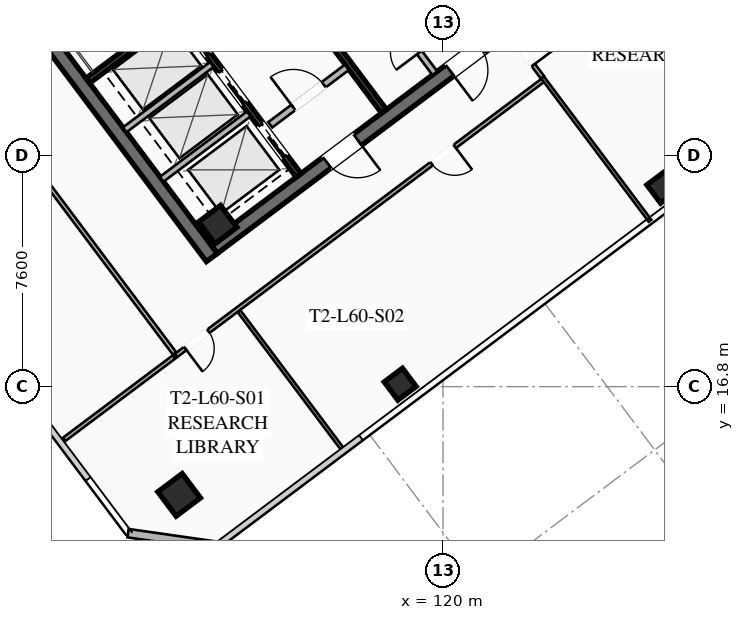
"""IFC4 building model, lengths in metres.
Left out: names, types, materials, properties, quantities, classifications, styles, units other than length and angle.
Written with IfcOpenShell. Run it as: python <this file> out.ifc"""

import sys

from ifc_helpers import new_model, si_unit, direction, frame, frame_2d, origin, origin_2d, place, context, subcontext, project, spatial, rectangle, hollow_rectangle, extrude, element, fill, save


model = new_model("IFC4")
c1 = context("Model", 3, precision=1e-05, world=origin(), true_north=direction((0.0, 1.0)))
c2 = subcontext(c1, "Body", "Model", "MODEL_VIEW")
j1 = project(units=[si_unit("LENGTHUNIT", "METRE"), si_unit("PLANEANGLEUNIT", "RADIAN")], contexts=[c1])
p1 = place(None, origin())
s1 = spatial("IfcSite", under=j1, at=p1, CompositionType="ELEMENT")
p2 = place(p1, origin())
s2 = spatial("IfcBuilding", under=s1, at=p2, CompositionType="ELEMENT")
p3 = place(p2, frame((0.0, 0.0, 221.95)))
s3 = spatial("IfcBuildingStorey", under=s2, at=p3, CompositionType="ELEMENT", Elevation=221.95)
p4 = place(p3, frame((112.396, 21.047, 0.0), z_axis=(0.0, 0.0, 1.0), x_axis=(-0.600005007985, 0.799996243986, 0.0)))
e1 = element("IfcWall", 1, at=p4, inside=s3, PredefinedType="SHEAR", context=c2, shape_type="SweptSolid", body=[
    extrude(rectangle(XDim=15.6, YDim=0.45, at=frame_2d((7.8, 0.0))), origin(), (0.0, 0.0, 1.0), 3.55),
])
p5 = place(p3, frame((124.649, 30.518, 0.0), z_axis=(0.0, 0.0, 1.0), x_axis=(-0.8, -0.6, 0.0)))
e2 = element("IfcWall", 2, at=p5, inside=s3, PredefinedType="SHEAR", context=c2, shape_type="SweptSolid", body=[
    extrude(rectangle(XDim=15.26, YDim=0.45, at=frame_2d((7.63, 0.0))), origin(), (0.0, 0.0, 1.0), 3.55),
])
p6 = place(p5, frame((9.33, 0.0, 0.0)))
e3 = element("IfcOpeningElement", 3, at=p6, cuts=e2, PredefinedType="OPENING", context=c2, shape_type="SweptSolid", body=[
    extrude(rectangle(XDim=1.25, YDim=2.25, at=frame_2d((0.625, 1.125))), frame((0.0, 0.235, 0.0), z_axis=(0.0, -1.0, 0.0), x_axis=(1.0, 0.0, 0.0)), (0.0, 0.0, 1.0), 0.47),
])
p7 = place(p5, frame((4.28, 0.0, 0.0)))
e4 = element("IfcOpeningElement", 4, at=p7, cuts=e2, PredefinedType="OPENING", context=c2, shape_type="SweptSolid", body=[
    extrude(rectangle(XDim=1.25, YDim=2.25, at=frame_2d((0.625, 1.125))), frame((0.0, 0.235, 0.0), z_axis=(0.0, -1.0, 0.0), x_axis=(1.0, 0.0, 0.0)), (0.0, 0.0, 1.0), 0.47),
])
p8 = place(p3, frame((112.59, 22.13, 0.0), z_axis=(0.0, 0.0, 1.0), x_axis=(0.799999996291, 0.600000004945, 0.0)))
e5 = element("IfcColumn", 5, at=p8, inside=s3, PredefinedType="COLUMN", context=c2, shape_type="SweptSolid", body=[
    extrude(hollow_rectangle(XDim=0.9, YDim=0.9, WallThickness=0.04, at=origin_2d()), origin(), (0.0, 0.0, 1.0), 3.37),
])
p9 = place(p3, frame((111.32, 13.24, 0.0), z_axis=(0.0, 0.0, 1.0), x_axis=(0.799999996291, 0.600000004945, 0.0)))
e6 = element("IfcColumn", 6, at=p9, inside=s3, PredefinedType="COLUMN", context=c2, shape_type="SweptSolid", body=[
    extrude(hollow_rectangle(XDim=1.0, YDim=1.0, WallThickness=0.04, at=origin_2d()), origin(), (0.0, 0.0, 1.0), 3.37),
])
for number, where, z_axis, x_axis in (
    (7, (118.59, 16.88, 0.0), (0.0, 0.0, 1.0), (0.8, 0.6, 0.0)),
    (8, (127.23, 23.36, 0.0), (0.0, 0.0, 1.0), (0.8, 0.6, 0.0)),
):
    element("IfcColumn", number, at=place(p3, frame(where, z_axis=z_axis, x_axis=x_axis)), inside=s3, PredefinedType="COLUMN", context=c2, shape_type="SweptSolid", body=[
        extrude(hollow_rectangle(XDim=0.75, YDim=0.75, WallThickness=0.032, at=origin_2d()), origin(), (0.0, 0.0, 1.0), 3.37),
    ])
p10 = place(p3, frame((112.58, 11.56, 0.0), z_axis=(0.0, 0.0, 1.0), x_axis=(-0.989954425158, 0.14138683146, 0.0)))
e9 = element("IfcWall", 9, at=p10, inside=s3, PredefinedType="SOLIDWALL", context=c2, shape_type="SweptSolid", body=[
    extrude(rectangle(XDim=2.97, YDim=0.28, at=frame_2d((1.485, 0.0))), origin(), (0.0, 0.0, 1.0), 3.37),
])
p11 = place(p3, frame((108.316, 26.862, 0.0), z_axis=(0.0, 0.0, 1.0), x_axis=(0.800014909178, 0.599980120581, 0.0)))
e10 = element("IfcWall", 10, at=p11, inside=s3, PredefinedType="SHEAR", context=c2, shape_type="SweptSolid", body=[
    extrude(rectangle(XDim=3.93, YDim=0.2, at=frame_2d((1.965, 0.0))), origin(), (0.0, 0.0, 1.0), 3.37),
])
p12 = place(p3, frame((118.058, 25.856, 0.0), z_axis=(0.0, 0.0, 1.0), x_axis=(-0.600002657301, 0.799998007018, 0.0)))
e11 = element("IfcWall", 11, at=p12, inside=s3, PredefinedType="SHEAR", context=c2, shape_type="SweptSolid", body=[
    extrude(rectangle(XDim=14.7, YDim=0.2, at=frame_2d((7.35, 0.0))), origin(), (0.0, 0.0, 1.0), 3.37),
])
p13 = place(p3, frame((114.316, 25.412, 0.0), z_axis=(0.0, 0.0, 1.0), x_axis=(0.800018601094, 0.59997519774, 0.0)))
e12 = element("IfcWall", 12, at=p13, inside=s3, PredefinedType="SOLIDWALL", context=c2, shape_type="SweptSolid", body=[
    extrude(rectangle(XDim=3.15, YDim=0.22, at=frame_2d((1.575, 0.0))), origin(), (0.0, 0.0, 1.0), 2.723),
])
p14 = place(p13, frame((0.95, 0.0, 0.0)))
e13 = element("IfcOpeningElement", 13, at=p14, cuts=e12, PredefinedType="OPENING", context=c2, shape_type="SweptSolid", body=[
    extrude(rectangle(XDim=1.25, YDim=2.25, at=frame_2d((0.625, 1.125))), frame((0.0, 0.12, 0.0), z_axis=(0.0, -1.0, 0.0), x_axis=(1.0, 0.0, 0.0)), (0.0, 0.0, 1.0), 0.24),
])
p15 = place(p3, frame((115.25, 23.75, 0.0), z_axis=(0.0, 0.0, 1.0), x_axis=(-0.599994036198, 0.800004472816, 0.0)))
e14 = element("IfcWall", 14, at=p15, inside=s3, PredefinedType="SHEAR", context=c2, shape_type="SweptSolid", body=[
    extrude(rectangle(XDim=6.55, YDim=0.2, at=frame_2d((3.275, 0.0))), origin(), (0.0, 0.0, 1.0), 3.37),
])
p16 = place(p15, frame((4.975, 0.0, 0.0)))
e15 = element("IfcOpeningElement", 15, at=p16, cuts=e14, PredefinedType="OPENING", context=c2, shape_type="SweptSolid", body=[
    extrude(rectangle(XDim=1.3, YDim=2.25, at=frame_2d((0.65, 1.125))), frame((0.0, 0.11, 0.0), z_axis=(0.0, -1.0, 0.0), x_axis=(1.0, 0.0, 0.0)), (0.0, 0.0, 1.0), 0.22),
])
p17 = place(p15, frame((2.975, 0.0, 0.0)))
e16 = element("IfcOpeningElement", 16, at=p17, cuts=e14, PredefinedType="OPENING", context=c2, shape_type="SweptSolid", body=[
    extrude(rectangle(XDim=1.3, YDim=2.25, at=frame_2d((0.65, 1.125))), frame((0.0, 0.11, 0.0), z_axis=(0.0, -1.0, 0.0), x_axis=(1.0, 0.0, 0.0)), (0.0, 0.0, 1.0), 0.22),
])
p18 = place(p15, frame((0.775, 0.0, 0.0)))
e17 = element("IfcOpeningElement", 17, at=p18, cuts=e14, PredefinedType="OPENING", context=c2, shape_type="SweptSolid", body=[
    extrude(rectangle(XDim=1.3, YDim=2.25, at=frame_2d((0.65, 1.125))), frame((0.0, 0.11, 0.0), z_axis=(0.0, -1.0, 0.0), x_axis=(1.0, 0.0, 0.0)), (0.0, 0.0, 1.0), 0.22),
])
for number, where, z_axis, x_axis in (
    (18, (110.746, 23.622, 0.0), (0.0, 0.0, 1.0), (0.8, 0.6, 0.0)),
    (19, (109.528, 25.246, 0.0), (0.0, 0.0, 1.0), (0.8, 0.6, 0.0)),
):
    element("IfcWall", number, at=place(p3, frame(where, z_axis=z_axis, x_axis=x_axis)), inside=s3, PredefinedType="SOLIDWALL", context=c2, shape_type="SweptSolid", body=[
        extrude(rectangle(XDim=3.58, YDim=0.2, at=frame_2d((1.79, 0.0))), origin(), (0.0, 0.0, 1.0), 3.37),
    ])
p19 = place(p3, frame((119.73, 27.11, 0.0), z_axis=(0.0, 0.0, 1.0), x_axis=(-0.600005580459, 0.799995814625, 0.0)))
e20 = element("IfcWall", 20, at=p19, inside=s3, PredefinedType="SOLIDWALL", context=c2, shape_type="SweptSolid", body=[
    extrude(rectangle(XDim=7.0, YDim=0.2, at=frame_2d((3.5, 0.0))), origin(), (0.0, 0.0, 1.0), 2.723),
])
p20 = place(p19, frame((0.85, 0.0, 0.0)))
e21 = element("IfcOpeningElement", 21, at=p20, cuts=e20, PredefinedType="OPENING", context=c2, shape_type="SweptSolid", body=[
    extrude(rectangle(XDim=0.95, YDim=2.05, at=frame_2d((0.475, 1.025))), frame((0.0, 0.11, 0.0), z_axis=(0.0, -1.0, 0.0), x_axis=(1.0, 0.0, 0.0)), (0.0, 0.0, 1.0), 0.22),
])
p21 = place(p19, frame((4.8, 0.0, 0.0)))
e22 = element("IfcOpeningElement", 22, at=p21, cuts=e20, PredefinedType="OPENING", context=c2, shape_type="SweptSolid", body=[
    extrude(rectangle(XDim=1.05, YDim=2.2, at=frame_2d((0.525, 1.1))), frame((0.0, 0.11, 0.0), z_axis=(0.0, -1.0, 0.0), x_axis=(1.0, 0.0, 0.0)), (0.0, 0.0, 1.0), 0.22),
])
p22 = place(p3, frame((123.322, 26.904, 0.0), z_axis=(0.0, 0.0, 1.0), x_axis=(-0.799996127317, -0.600005163543, 0.0)))
e23 = element("IfcWall", 23, at=p22, inside=s3, PredefinedType="PARTITIONING", context=c2, shape_type="SweptSolid", body=[
    extrude(rectangle(XDim=15.13, YDim=0.135, at=frame_2d((7.565, 0.0))), origin(), (0.0, 0.0, 1.0), 2.723),
])
p23 = place(p22, frame((13.8, 0.0, 0.0)))
e24 = element("IfcOpeningElement", 24, at=p23, cuts=e23, PredefinedType="OPENING", context=c2, shape_type="SweptSolid", body=[
    extrude(rectangle(XDim=0.95, YDim=2.05, at=frame_2d((0.475, 1.025))), frame((0.0, 0.077, 0.0), z_axis=(0.0, -1.0, 0.0), x_axis=(1.0, 0.0, 0.0)), (0.0, 0.0, 1.0), 0.155),
])
p24 = place(p22, frame((3.672, 0.0, 0.0)))
e25 = element("IfcOpeningElement", 25, at=p24, cuts=e23, PredefinedType="OPENING", context=c2, shape_type="SweptSolid", body=[
    extrude(rectangle(XDim=0.95, YDim=2.05, at=frame_2d((0.475, 1.025))), frame((0.0, 0.077, 0.0), z_axis=(0.0, -1.0, 0.0), x_axis=(1.0, 0.0, 0.0)), (0.0, 0.0, 1.0), 0.155),
])
p25 = place(p3, frame((122.248, 28.336, 0.0), z_axis=(0.0, 0.0, 1.0), x_axis=(0.599977154362, -0.800017133719, 0.0)))
e26 = element("IfcWall", 26, at=p25, inside=s3, PredefinedType="PARTITIONING", context=c2, shape_type="SweptSolid", body=[
    extrude(rectangle(XDim=1.71, YDim=0.135, at=frame_2d((0.855, 0.0))), origin(), (0.0, 0.0, 1.0), 2.723),
])
p26 = place(p25, frame((0.25, 0.0, 0.0)))
e27 = element("IfcOpeningElement", 27, at=p26, cuts=e26, PredefinedType="OPENING", context=c2, shape_type="SweptSolid", body=[
    extrude(rectangle(XDim=0.95, YDim=2.05, at=frame_2d((0.475, 1.025))), frame((0.0, 0.077, 0.0), z_axis=(0.0, -1.0, 0.0), x_axis=(1.0, 0.0, 0.0)), (0.0, 0.0, 1.0), 0.155),
])
p27 = place(p3, frame((116.728, 14.696, 0.0), z_axis=(0.0, 0.0, 1.0), x_axis=(-0.6, 0.8, 0.0)))
e28 = element("IfcWall", 28, at=p27, inside=s3, PredefinedType="PARTITIONING", context=c2, shape_type="SweptSolid", body=[
    extrude(rectangle(XDim=5.73, YDim=0.11, at=frame_2d((2.865, 0.0))), origin(), (0.0, 0.0, 1.0), 2.723),
])
p28 = place(p3, frame((126.808, 22.256, 0.0), z_axis=(0.0, 0.0, 1.0), x_axis=(-0.600026527508, 0.799980103682, 0.0)))
e29 = element("IfcWall", 29, at=p28, inside=s3, PredefinedType="PARTITIONING", context=c2, shape_type="SweptSolid", body=[
    extrude(rectangle(XDim=5.89, YDim=0.11, at=frame_2d((2.945, 0.0))), origin(), (0.0, 0.0, 1.0), 2.723),
])
p29 = place(p3, frame((111.17, 17.89, 0.0), z_axis=(0.0, 0.0, 1.0), x_axis=(-0.599998113842, 0.800001414615, 0.0)))
e30 = element("IfcWall", 30, at=p29, inside=s3, PredefinedType="PARTITIONING", context=c2, shape_type="SweptSolid", body=[
    extrude(rectangle(XDim=20.71, YDim=0.135, at=frame_2d((10.355, 0.0))), origin(), (0.0, 0.0, 1.0), 2.723),
])
p30 = place(p29, frame((19.46, 0.0, 0.0)))
e31 = element("IfcOpeningElement", 31, at=p30, cuts=e30, PredefinedType="OPENING", context=c2, shape_type="SweptSolid", body=[
    extrude(rectangle(XDim=0.95, YDim=2.05, at=frame_2d((0.475, 1.025))), frame((0.0, 0.077, 0.0), z_axis=(0.0, -1.0, 0.0), x_axis=(1.0, 0.0, 0.0)), (0.0, 0.0, 1.0), 0.155),
])
p31 = place(p3, frame((107.538, 15.066, 0.0), z_axis=(0.0, 0.0, 1.0), x_axis=(0.799980555045, 0.600025925731, 0.0)))
e32 = element("IfcWall", 32, at=p31, inside=s3, PredefinedType="PARTITIONING", context=c2, shape_type="SweptSolid", body=[
    extrude(rectangle(XDim=4.52, YDim=0.135, at=frame_2d((2.26, 0.0))), origin(), (0.0, 0.0, 1.0), 2.723),
])
p32 = place(p6, origin())
e33 = element("IfcDoor", 33, at=p32, inside=s3, OperationType="SINGLE_SWING_LEFT", PredefinedType="DOOR", context=c2, shape_type="SweptSolid", body=[
    extrude(rectangle(XDim=1.25, YDim=2.25, at=frame_2d((0.625, 1.125))), frame((0.0, 0.025, 0.0), z_axis=(0.0, -1.0, 0.0), x_axis=(1.0, 0.0, 0.0)), (0.0, 0.0, 1.0), 0.05),
])
fill(e3, e33)
p33 = place(p7, origin())
e34 = element("IfcDoor", 34, at=p33, inside=s3, OperationType="SINGLE_SWING_RIGHT", PredefinedType="DOOR", context=c2, shape_type="SweptSolid", body=[
    extrude(rectangle(XDim=1.25, YDim=2.25, at=frame_2d((0.625, 1.125))), frame((0.0, 0.025, 0.0), z_axis=(0.0, -1.0, 0.0), x_axis=(1.0, 0.0, 0.0)), (0.0, 0.0, 1.0), 0.05),
])
fill(e4, e34)
p34 = place(p14, origin())
e35 = element("IfcDoor", 35, at=p34, inside=s3, OperationType="SINGLE_SWING_LEFT", PredefinedType="DOOR", context=c2, shape_type="SweptSolid", body=[
    extrude(rectangle(XDim=1.25, YDim=2.25, at=frame_2d((0.625, 1.125))), frame((0.0, 0.025, 0.0), z_axis=(0.0, -1.0, 0.0), x_axis=(1.0, 0.0, 0.0)), (0.0, 0.0, 1.0), 0.05),
])
fill(e13, e35)
p35 = place(p20, origin())
e36 = element("IfcDoor", 36, at=p35, inside=s3, OperationType="SINGLE_SWING_LEFT", PredefinedType="DOOR", context=c2, shape_type="SweptSolid", body=[
    extrude(rectangle(XDim=0.95, YDim=2.05, at=frame_2d((0.475, 1.025))), frame((0.0, 0.025, 0.0), z_axis=(0.0, -1.0, 0.0), x_axis=(1.0, 0.0, 0.0)), (0.0, 0.0, 1.0), 0.05),
])
fill(e21, e36)
p36 = place(p23, origin())
e37 = element("IfcDoor", 37, at=p36, inside=s3, OperationType="SINGLE_SWING_RIGHT", PredefinedType="DOOR", context=c2, shape_type="SweptSolid", body=[
    extrude(rectangle(XDim=0.95, YDim=2.05, at=frame_2d((0.475, 1.025))), frame((0.0, 0.025, 0.0), z_axis=(0.0, -1.0, 0.0), x_axis=(1.0, 0.0, 0.0)), (0.0, 0.0, 1.0), 0.05),
])
fill(e24, e37)
p37 = place(p24, origin())
e38 = element("IfcDoor", 38, at=p37, inside=s3, OperationType="SINGLE_SWING_LEFT", PredefinedType="DOOR", context=c2, shape_type="SweptSolid", body=[
    extrude(rectangle(XDim=0.95, YDim=2.05, at=frame_2d((0.475, 1.025))), frame((0.0, 0.025, 0.0), z_axis=(0.0, -1.0, 0.0), x_axis=(1.0, 0.0, 0.0)), (0.0, 0.0, 1.0), 0.05),
])
fill(e25, e38)
p38 = place(p26, origin())
e39 = element("IfcDoor", 39, at=p38, inside=s3, OperationType="SINGLE_SWING_RIGHT", PredefinedType="DOOR", context=c2, shape_type="SweptSolid", body=[
    extrude(rectangle(XDim=0.95, YDim=2.05, at=frame_2d((0.475, 1.025))), frame((0.0, 0.025, 0.0), z_axis=(0.0, -1.0, 0.0), x_axis=(1.0, 0.0, 0.0)), (0.0, 0.0, 1.0), 0.05),
])
fill(e27, e39)
p39 = place(p16, origin())
e40 = element("IfcDoor", 40, at=p39, inside=s3, OperationType="SLIDING_TO_LEFT", PredefinedType="DOOR", context=c2, shape_type="SweptSolid", body=[
    extrude(rectangle(XDim=1.3, YDim=2.25, at=frame_2d((0.65, 1.125))), frame((0.0, 0.025, 0.0), z_axis=(0.0, -1.0, 0.0), x_axis=(1.0, 0.0, 0.0)), (0.0, 0.0, 1.0), 0.05),
])
fill(e15, e40)
p40 = place(p17, origin())
e41 = element("IfcDoor", 41, at=p40, inside=s3, OperationType="SLIDING_TO_LEFT", PredefinedType="DOOR", context=c2, shape_type="SweptSolid", body=[
    extrude(rectangle(XDim=1.3, YDim=2.25, at=frame_2d((0.65, 1.125))), frame((0.0, 0.025, 0.0), z_axis=(0.0, -1.0, 0.0), x_axis=(1.0, 0.0, 0.0)), (0.0, 0.0, 1.0), 0.05),
])
fill(e16, e41)
p41 = place(p18, origin())
e42 = element("IfcDoor", 42, at=p41, inside=s3, OperationType="SLIDING_TO_LEFT", PredefinedType="DOOR", context=c2, shape_type="SweptSolid", body=[
    extrude(rectangle(XDim=1.3, YDim=2.25, at=frame_2d((0.65, 1.125))), frame((0.0, 0.025, 0.0), z_axis=(0.0, -1.0, 0.0), x_axis=(1.0, 0.0, 0.0)), (0.0, 0.0, 1.0), 0.05),
])
fill(e17, e42)
save(model, sys.argv[1])
